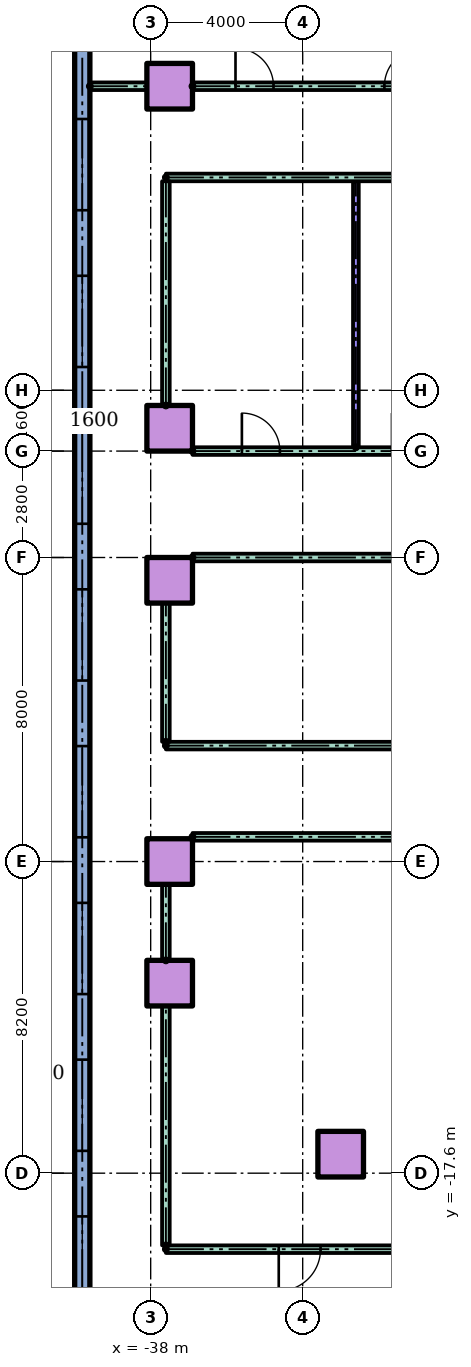
"""IFC4 building model, lengths in metres.
Left out: names, types, materials, properties, quantities, classifications, styles, units other than length and angle.
Written with IfcOpenShell. Run it as: python <this file> out.ifc"""

import sys

from ifc_helpers import new_model, si_unit, direction, frame, frame_2d, origin, origin_2d, place, context, subcontext, project, spatial, rectangle, hollow_rectangle, extrude, element, fill, save


model = new_model("IFC4")
c1 = context("Model", 3, precision=1e-05, world=origin(), true_north=direction((0.0, 1.0)))
c2 = subcontext(c1, "Body", "Model", "MODEL_VIEW")
j1 = project(units=[si_unit("LENGTHUNIT", "METRE"), si_unit("PLANEANGLEUNIT", "RADIAN")], contexts=[c1])
p1 = place(None, origin())
s1 = spatial("IfcSite", under=j1, at=p1, CompositionType="ELEMENT")
p2 = place(p1, origin())
s2 = spatial("IfcBuilding", under=s1, at=p2, CompositionType="ELEMENT")
p3 = place(p2, frame((0.0, 0.0, 10.0)))
s3 = spatial("IfcBuildingStorey", under=s2, at=p3, CompositionType="ELEMENT", Elevation=10.0)
for number, where in (
    (1, (-33.0, -17.1, 0.0)),
    (2, (-37.5, -12.6, 0.0)),
    (3, (-37.5, -9.4, 0.0)),
    (4, (-37.5, -2.0, 0.0)),
    (5, (-37.5, 2.0, 0.0)),
    (6, (-37.5, 11.0, 0.0)),
):
    element("IfcColumn", number, at=place(p3, frame(where)), inside=s3, PredefinedType="COLUMN", context=c2, shape_type="SweptSolid", body=[
        extrude(hollow_rectangle(XDim=1.2, YDim=1.2, WallThickness=0.06, at=origin_2d()), origin(), (0.0, 0.0, 1.0), 4.0),
    ])
p4 = place(p3, frame((-39.8, 20.0, 0.0), z_axis=(0.0, 0.0, 1.0), x_axis=(0.0, -1.0, 0.0)))
e7 = element("IfcWall", 7, at=p4, inside=s3, PredefinedType="STANDARD", context=c2, shape_type="SweptSolid", body=[
    extrude(rectangle(XDim=70.0, YDim=0.4, at=frame_2d((35.0, 0.0))), origin(), (0.0, 0.0, 1.0), 3.7),
])
p5 = place(p4, frame((1.05, 0.0, 0.9)))
e8 = element("IfcOpeningElement", 8, at=p5, cuts=e7, PredefinedType="OPENING", context=c2, shape_type="SweptSolid", body=[
    extrude(rectangle(XDim=2.4, YDim=2.1, at=frame_2d((1.2, 1.05))), frame((0.0, 0.21, 0.0), z_axis=(0.0, -1.0, 0.0), x_axis=(1.0, 0.0, 0.0)), (0.0, 0.0, 1.0), 0.42),
])
p6 = place(p4, frame((5.55, 0.0, 0.9)))
e9 = element("IfcOpeningElement", 9, at=p6, cuts=e7, PredefinedType="OPENING", context=c2, shape_type="SweptSolid", body=[
    extrude(rectangle(XDim=2.4, YDim=2.1, at=frame_2d((1.2, 1.05))), frame((0.0, 0.21, 0.0), z_axis=(0.0, -1.0, 0.0), x_axis=(1.0, 0.0, 0.0)), (0.0, 0.0, 1.0), 0.42),
])
p7 = place(p4, frame((9.863, 0.0, 0.9)))
e10 = element("IfcOpeningElement", 10, at=p7, cuts=e7, PredefinedType="OPENING", context=c2, shape_type="SweptSolid", body=[
    extrude(rectangle(XDim=2.4, YDim=2.1, at=frame_2d((1.2, 1.05))), frame((0.0, 0.21, 0.0), z_axis=(0.0, -1.0, 0.0), x_axis=(1.0, 0.0, 0.0)), (0.0, 0.0, 1.0), 0.42),
])
p8 = place(p4, frame((13.988, 0.0, 0.9)))
e11 = element("IfcOpeningElement", 11, at=p8, cuts=e7, PredefinedType="OPENING", context=c2, shape_type="SweptSolid", body=[
    extrude(rectangle(XDim=2.4, YDim=2.1, at=frame_2d((1.2, 1.05))), frame((0.0, 0.21, 0.0), z_axis=(0.0, -1.0, 0.0), x_axis=(1.0, 0.0, 0.0)), (0.0, 0.0, 1.0), 0.42),
])
p9 = place(p4, frame((18.113, 0.0, 0.9)))
e12 = element("IfcOpeningElement", 12, at=p9, cuts=e7, PredefinedType="OPENING", context=c2, shape_type="SweptSolid", body=[
    extrude(rectangle(XDim=2.4, YDim=2.1, at=frame_2d((1.2, 1.05))), frame((0.0, 0.21, 0.0), z_axis=(0.0, -1.0, 0.0), x_axis=(1.0, 0.0, 0.0)), (0.0, 0.0, 1.0), 0.42),
])
p10 = place(p4, frame((22.238, 0.0, 0.9)))
e13 = element("IfcOpeningElement", 13, at=p10, cuts=e7, PredefinedType="OPENING", context=c2, shape_type="SweptSolid", body=[
    extrude(rectangle(XDim=2.4, YDim=2.1, at=frame_2d((1.2, 1.05))), frame((0.0, 0.21, 0.0), z_axis=(0.0, -1.0, 0.0), x_axis=(1.0, 0.0, 0.0)), (0.0, 0.0, 1.0), 0.42),
])
p11 = place(p4, frame((26.363, 0.0, 0.9)))
e14 = element("IfcOpeningElement", 14, at=p11, cuts=e7, PredefinedType="OPENING", context=c2, shape_type="SweptSolid", body=[
    extrude(rectangle(XDim=2.4, YDim=2.1, at=frame_2d((1.2, 1.05))), frame((0.0, 0.21, 0.0), z_axis=(0.0, -1.0, 0.0), x_axis=(1.0, 0.0, 0.0)), (0.0, 0.0, 1.0), 0.42),
])
p12 = place(p4, frame((30.488, 0.0, 0.9)))
e15 = element("IfcOpeningElement", 15, at=p12, cuts=e7, PredefinedType="OPENING", context=c2, shape_type="SweptSolid", body=[
    extrude(rectangle(XDim=2.4, YDim=2.1, at=frame_2d((1.2, 1.05))), frame((0.0, 0.21, 0.0), z_axis=(0.0, -1.0, 0.0), x_axis=(1.0, 0.0, 0.0)), (0.0, 0.0, 1.0), 0.42),
])
p13 = place(p4, frame((34.613, 0.0, 0.9)))
e16 = element("IfcOpeningElement", 16, at=p13, cuts=e7, PredefinedType="OPENING", context=c2, shape_type="SweptSolid", body=[
    extrude(rectangle(XDim=2.4, YDim=2.1, at=frame_2d((1.2, 1.05))), frame((0.0, 0.21, 0.0), z_axis=(0.0, -1.0, 0.0), x_axis=(1.0, 0.0, 0.0)), (0.0, 0.0, 1.0), 0.42),
])
p14 = place(p4, frame((38.738, 0.0, 0.9)))
e17 = element("IfcOpeningElement", 17, at=p14, cuts=e7, PredefinedType="OPENING", context=c2, shape_type="SweptSolid", body=[
    extrude(rectangle(XDim=2.4, YDim=2.1, at=frame_2d((1.2, 1.05))), frame((0.0, 0.21, 0.0), z_axis=(0.0, -1.0, 0.0), x_axis=(1.0, 0.0, 0.0)), (0.0, 0.0, 1.0), 0.42),
])
p15 = place(p4, frame((42.633, 0.0, 0.9)))
e18 = element("IfcOpeningElement", 18, at=p15, cuts=e7, PredefinedType="OPENING", context=c2, shape_type="SweptSolid", body=[
    extrude(rectangle(XDim=2.4, YDim=2.1, at=frame_2d((1.2, 1.05))), frame((0.0, 0.21, 0.0), z_axis=(0.0, -1.0, 0.0), x_axis=(1.0, 0.0, 0.0)), (0.0, 0.0, 1.0), 0.42),
])
p16 = place(p4, frame((46.3, 0.0, 0.9)))
e19 = element("IfcOpeningElement", 19, at=p16, cuts=e7, PredefinedType="OPENING", context=c2, shape_type="SweptSolid", body=[
    extrude(rectangle(XDim=2.4, YDim=2.1, at=frame_2d((1.2, 1.05))), frame((0.0, 0.21, 0.0), z_axis=(0.0, -1.0, 0.0), x_axis=(1.0, 0.0, 0.0)), (0.0, 0.0, 1.0), 0.42),
])
p17 = place(p4, frame((49.967, 0.0, 0.9)))
e20 = element("IfcOpeningElement", 20, at=p17, cuts=e7, PredefinedType="OPENING", context=c2, shape_type="SweptSolid", body=[
    extrude(rectangle(XDim=2.4, YDim=2.1, at=frame_2d((1.2, 1.05))), frame((0.0, 0.21, 0.0), z_axis=(0.0, -1.0, 0.0), x_axis=(1.0, 0.0, 0.0)), (0.0, 0.0, 1.0), 0.42),
])
p18 = place(p4, frame((66.85, 0.0, 0.9)))
e21 = element("IfcOpeningElement", 21, at=p18, cuts=e7, PredefinedType="OPENING", context=c2, shape_type="SweptSolid", body=[
    extrude(rectangle(XDim=2.4, YDim=2.1, at=frame_2d((1.2, 1.05))), frame((0.0, 0.21, 0.0), z_axis=(0.0, -1.0, 0.0), x_axis=(1.0, 0.0, 0.0)), (0.0, 0.0, 1.0), 0.42),
])
p19 = place(p3, frame((-37.6, -19.6, 0.0)))
e22 = element("IfcWall", 22, at=p19, inside=s3, PredefinedType="PARTITIONING", context=c2, shape_type="SweptSolid", body=[
    extrude(rectangle(XDim=75.2, YDim=0.2, at=frame_2d((37.6, 0.0))), origin(), (0.0, 0.0, 1.0), 3.7),
])
p20 = place(p19, frame((2.97, 0.0, 0.0)))
e23 = element("IfcOpeningElement", 23, at=p20, cuts=e22, PredefinedType="OPENING", context=c2, shape_type="SweptSolid", body=[
    extrude(rectangle(XDim=1.1, YDim=2.1, at=frame_2d((0.55, 1.05))), frame((0.0, 0.11, 0.0), z_axis=(0.0, -1.0, 0.0), x_axis=(1.0, 0.0, 0.0)), (0.0, 0.0, 1.0), 0.22),
])
p21 = place(p19, frame((11.93, 0.0, 0.0)))
e24 = element("IfcOpeningElement", 24, at=p21, cuts=e22, PredefinedType="OPENING", context=c2, shape_type="SweptSolid", body=[
    extrude(rectangle(XDim=1.1, YDim=2.1, at=frame_2d((0.55, 1.05))), frame((0.0, 0.11, 0.0), z_axis=(0.0, -1.0, 0.0), x_axis=(1.0, 0.0, 0.0)), (0.0, 0.0, 1.0), 0.22),
])
p22 = place(p19, frame((21.5, 0.0, 0.0)))
e25 = element("IfcOpeningElement", 25, at=p22, cuts=e22, PredefinedType="OPENING", context=c2, shape_type="SweptSolid", body=[
    extrude(rectangle(XDim=1.0, YDim=2.1, at=frame_2d((0.5, 1.05))), frame((0.0, 0.11, 0.0), z_axis=(0.0, -1.0, 0.0), x_axis=(1.0, 0.0, 0.0)), (0.0, 0.0, 1.0), 0.22),
])
p23 = place(p19, frame((32.5, 0.0, 0.0)))
e26 = element("IfcOpeningElement", 26, at=p23, cuts=e22, PredefinedType="OPENING", context=c2, shape_type="SweptSolid", body=[
    extrude(rectangle(XDim=1.0, YDim=2.1, at=frame_2d((0.5, 1.05))), frame((0.0, 0.11, 0.0), z_axis=(0.0, -1.0, 0.0), x_axis=(1.0, 0.0, 0.0)), (0.0, 0.0, 1.0), 0.22),
])
p24 = place(p19, frame((41.5, 0.0, 0.0)))
e27 = element("IfcOpeningElement", 27, at=p24, cuts=e22, PredefinedType="OPENING", context=c2, shape_type="SweptSolid", body=[
    extrude(rectangle(XDim=1.0, YDim=2.1, at=frame_2d((0.5, 1.05))), frame((0.0, 0.11, 0.0), z_axis=(0.0, -1.0, 0.0), x_axis=(1.0, 0.0, 0.0)), (0.0, 0.0, 1.0), 0.22),
])
p25 = place(p19, frame((50.5, 0.0, 0.0)))
e28 = element("IfcOpeningElement", 28, at=p25, cuts=e22, PredefinedType="OPENING", context=c2, shape_type="SweptSolid", body=[
    extrude(rectangle(XDim=1.0, YDim=2.1, at=frame_2d((0.5, 1.05))), frame((0.0, 0.11, 0.0), z_axis=(0.0, -1.0, 0.0), x_axis=(1.0, 0.0, 0.0)), (0.0, 0.0, 1.0), 0.22),
])
p26 = place(p19, frame((59.724, 0.0, 0.0)))
e29 = element("IfcOpeningElement", 29, at=p26, cuts=e22, PredefinedType="OPENING", context=c2, shape_type="SweptSolid", body=[
    extrude(rectangle(XDim=1.0, YDim=2.1, at=frame_2d((0.5, 1.05))), frame((0.0, 0.11, 0.0), z_axis=(0.0, -1.0, 0.0), x_axis=(1.0, 0.0, 0.0)), (0.0, 0.0, 1.0), 0.22),
])
p27 = place(p19, frame((70.476, 0.0, 0.0)))
e30 = element("IfcOpeningElement", 30, at=p27, cuts=e22, PredefinedType="OPENING", context=c2, shape_type="SweptSolid", body=[
    extrude(rectangle(XDim=1.0, YDim=2.1, at=frame_2d((0.5, 1.05))), frame((0.0, 0.11, 0.0), z_axis=(0.0, -1.0, 0.0), x_axis=(1.0, 0.0, 0.0)), (0.0, 0.0, 1.0), 0.22),
])
p28 = place(p3, frame((-36.9, -8.75, 0.0)))
e31 = element("IfcWall", 31, at=p28, inside=s3, PredefinedType="PARTITIONING", context=c2, shape_type="SweptSolid", body=[
    extrude(rectangle(XDim=73.8, YDim=0.2, at=frame_2d((36.9, 0.0))), origin(), (0.0, 0.0, 1.0), 3.7),
])
p29 = place(p3, frame((-37.6, -6.35, 0.0)))
e32 = element("IfcWall", 32, at=p29, inside=s3, PredefinedType="PARTITIONING", context=c2, shape_type="SweptSolid", body=[
    extrude(rectangle(XDim=75.2, YDim=0.2, at=frame_2d((37.6, 0.0))), origin(), (0.0, 0.0, 1.0), 3.7),
])
p30 = place(p29, frame((6.5, 0.0, 0.0)))
e33 = element("IfcOpeningElement", 33, at=p30, cuts=e32, PredefinedType="OPENING", context=c2, shape_type="SweptSolid", body=[
    extrude(rectangle(XDim=1.0, YDim=2.1, at=frame_2d((0.5, 1.05))), frame((0.0, 0.11, 0.0), z_axis=(0.0, -1.0, 0.0), x_axis=(1.0, 0.0, 0.0)), (0.0, 0.0, 1.0), 0.22),
])
p31 = place(p29, frame((18.55, 0.0, 0.0)))
e34 = element("IfcOpeningElement", 34, at=p31, cuts=e32, PredefinedType="OPENING", context=c2, shape_type="SweptSolid", body=[
    extrude(rectangle(XDim=0.9, YDim=2.1, at=frame_2d((0.45, 1.05))), frame((0.0, 0.11, 0.0), z_axis=(0.0, -1.0, 0.0), x_axis=(1.0, 0.0, 0.0)), (0.0, 0.0, 1.0), 0.22),
])
p32 = place(p29, frame((27.55, 0.0, 0.0)))
e35 = element("IfcOpeningElement", 35, at=p32, cuts=e32, PredefinedType="OPENING", context=c2, shape_type="SweptSolid", body=[
    extrude(rectangle(XDim=0.9, YDim=2.1, at=frame_2d((0.45, 1.05))), frame((0.0, 0.11, 0.0), z_axis=(0.0, -1.0, 0.0), x_axis=(1.0, 0.0, 0.0)), (0.0, 0.0, 1.0), 0.22),
])
p33 = place(p29, frame((36.55, 0.0, 0.0)))
e36 = element("IfcOpeningElement", 36, at=p33, cuts=e32, PredefinedType="OPENING", context=c2, shape_type="SweptSolid", body=[
    extrude(rectangle(XDim=0.9, YDim=2.1, at=frame_2d((0.45, 1.05))), frame((0.0, 0.11, 0.0), z_axis=(0.0, -1.0, 0.0), x_axis=(1.0, 0.0, 0.0)), (0.0, 0.0, 1.0), 0.22),
])
p34 = place(p29, frame((48.5, 0.0, 0.0)))
e37 = element("IfcOpeningElement", 37, at=p34, cuts=e32, PredefinedType="OPENING", context=c2, shape_type="SweptSolid", body=[
    extrude(rectangle(XDim=1.0, YDim=2.1, at=frame_2d((0.5, 1.05))), frame((0.0, 0.11, 0.0), z_axis=(0.0, -1.0, 0.0), x_axis=(1.0, 0.0, 0.0)), (0.0, 0.0, 1.0), 0.22),
])
p35 = place(p29, frame((65.15, 0.0, 0.0)))
e38 = element("IfcOpeningElement", 38, at=p35, cuts=e32, PredefinedType="OPENING", context=c2, shape_type="SweptSolid", body=[
    extrude(rectangle(XDim=0.9, YDim=2.1, at=frame_2d((0.45, 1.05))), frame((0.0, 0.11, 0.0), z_axis=(0.0, -1.0, 0.0), x_axis=(1.0, 0.0, 0.0)), (0.0, 0.0, 1.0), 0.22),
])
p36 = place(p3, frame((-36.9, -1.4, 0.0)))
e39 = element("IfcWall", 39, at=p36, inside=s3, PredefinedType="PARTITIONING", context=c2, shape_type="SweptSolid", body=[
    extrude(rectangle(XDim=22.9, YDim=0.2, at=frame_2d((11.45, 0.0))), origin(), (0.0, 0.0, 1.0), 3.7),
])
p37 = place(p3, frame((-36.9, 1.4, 0.0)))
e40 = element("IfcWall", 40, at=p37, inside=s3, PredefinedType="PARTITIONING", context=c2, shape_type="SweptSolid", body=[
    extrude(rectangle(XDim=20.6, YDim=0.2, at=frame_2d((10.3, 0.0))), origin(), (0.0, 0.0, 1.0), 3.7),
])
p38 = place(p37, frame((1.3, 0.0, 0.0)))
e41 = element("IfcOpeningElement", 41, at=p38, cuts=e40, PredefinedType="OPENING", context=c2, shape_type="SweptSolid", body=[
    extrude(rectangle(XDim=1.0, YDim=2.1, at=frame_2d((0.5, 1.05))), frame((0.0, 0.11, 0.0), z_axis=(0.0, -1.0, 0.0), x_axis=(1.0, 0.0, 0.0)), (0.0, 0.0, 1.0), 0.22),
])
p39 = place(p37, frame((5.25, 0.0, 0.0)))
e42 = element("IfcOpeningElement", 42, at=p39, cuts=e40, PredefinedType="OPENING", context=c2, shape_type="SweptSolid", body=[
    extrude(rectangle(XDim=1.0, YDim=2.1, at=frame_2d((0.5, 1.05))), frame((0.0, 0.11, 0.0), z_axis=(0.0, -1.0, 0.0), x_axis=(1.0, 0.0, 0.0)), (0.0, 0.0, 1.0), 0.22),
])
p40 = place(p37, frame((10.0, 0.0, 0.0)))
e43 = element("IfcOpeningElement", 43, at=p40, cuts=e40, PredefinedType="OPENING", context=c2, shape_type="SweptSolid", body=[
    extrude(rectangle(XDim=1.0, YDim=2.1, at=frame_2d((0.5, 1.05))), frame((0.0, 0.11, 0.0), z_axis=(0.0, -1.0, 0.0), x_axis=(1.0, 0.0, 0.0)), (0.0, 0.0, 1.0), 0.22),
])
p41 = place(p37, frame((12.35, 0.0, 0.0)))
e44 = element("IfcOpeningElement", 44, at=p41, cuts=e40, PredefinedType="OPENING", context=c2, shape_type="SweptSolid", body=[
    extrude(rectangle(XDim=0.9, YDim=2.1, at=frame_2d((0.45, 1.05))), frame((0.0, 0.11, 0.0), z_axis=(0.0, -1.0, 0.0), x_axis=(1.0, 0.0, 0.0)), (0.0, 0.0, 1.0), 0.22),
])
p42 = place(p3, frame((-37.6, 8.6, 0.0)))
e45 = element("IfcWall", 45, at=p42, inside=s3, PredefinedType="PARTITIONING", context=c2, shape_type="SweptSolid", body=[
    extrude(rectangle(XDim=21.3, YDim=0.2, at=frame_2d((10.65, 0.0))), origin(), (0.0, 0.0, 1.0), 3.7),
])
p43 = place(p3, frame((-39.6, 11.0, 0.0)))
e46 = element("IfcWall", 46, at=p43, inside=s3, PredefinedType="PARTITIONING", context=c2, shape_type="SweptSolid", body=[
    extrude(rectangle(XDim=1.5, YDim=0.2, at=frame_2d((0.75, 0.0))), origin(), (0.0, 0.0, 1.0), 3.7),
])
p44 = place(p3, frame((-36.9, 11.0, 0.0)))
e47 = element("IfcWall", 47, at=p44, inside=s3, PredefinedType="PARTITIONING", context=c2, shape_type="SweptSolid", body=[
    extrude(rectangle(XDim=6.4, YDim=0.2, at=frame_2d((3.2, 0.0))), origin(), (0.0, 0.0, 1.0), 3.7),
])
p45 = place(p44, frame((1.132, 0.0, 0.0)))
e48 = element("IfcOpeningElement", 48, at=p45, cuts=e47, PredefinedType="OPENING", context=c2, shape_type="SweptSolid", body=[
    extrude(rectangle(XDim=1.0, YDim=2.1, at=frame_2d((0.5, 1.05))), frame((0.0, 0.11, 0.0), z_axis=(0.0, -1.0, 0.0), x_axis=(1.0, 0.0, 0.0)), (0.0, 0.0, 1.0), 0.22),
])
p46 = place(p44, frame((5.05, 0.0, 0.0)))
e49 = element("IfcOpeningElement", 49, at=p46, cuts=e47, PredefinedType="OPENING", context=c2, shape_type="SweptSolid", body=[
    extrude(rectangle(XDim=1.0, YDim=2.1, at=frame_2d((0.5, 1.05))), frame((0.0, 0.11, 0.0), z_axis=(0.0, -1.0, 0.0), x_axis=(1.0, 0.0, 0.0)), (0.0, 0.0, 1.0), 0.22),
])
p47 = place(p3, frame((-37.6, -19.5, 0.0), z_axis=(0.0, 0.0, 1.0), x_axis=(0.0, 1.0, 0.0)))
e50 = element("IfcWall", 50, at=p47, inside=s3, PredefinedType="PARTITIONING", context=c2, shape_type="SweptSolid", body=[
    extrude(rectangle(XDim=6.3, YDim=0.2, at=frame_2d((3.15, 0.0))), origin(), (0.0, 0.0, 1.0), 3.7),
])
p48 = place(p3, frame((-37.6, -12.0, 0.0), z_axis=(0.0, 0.0, 1.0), x_axis=(0.0, 1.0, 0.0)))
e51 = element("IfcWall", 51, at=p48, inside=s3, PredefinedType="PARTITIONING", context=c2, shape_type="SweptSolid", body=[
    extrude(rectangle(XDim=2.0, YDim=0.2, at=frame_2d((1.0, 0.0))), origin(), (0.0, 0.0, 1.0), 3.7),
])
p49 = place(p3, frame((-37.6, -6.25, 0.0), z_axis=(0.0, 0.0, 1.0), x_axis=(0.0, 1.0, 0.0)))
e52 = element("IfcWall", 52, at=p49, inside=s3, PredefinedType="PARTITIONING", context=c2, shape_type="SweptSolid", body=[
    extrude(rectangle(XDim=3.65, YDim=0.2, at=frame_2d((1.825, 0.0))), origin(), (0.0, 0.0, 1.0), 3.7),
])
p50 = place(p3, frame((-37.6, 2.6, 0.0), z_axis=(0.0, 0.0, 1.0), x_axis=(0.0, 1.0, 0.0)))
e53 = element("IfcWall", 53, at=p50, inside=s3, PredefinedType="PARTITIONING", context=c2, shape_type="SweptSolid", body=[
    extrude(rectangle(XDim=5.9, YDim=0.2, at=frame_2d((2.95, 0.0))), origin(), (0.0, 0.0, 1.0), 3.7),
])
p51 = place(p3, frame((-32.6, 1.5, 0.0), z_axis=(0.0, 0.0, 1.0), x_axis=(0.0, 1.0, 0.0)))
e54 = element("IfcWall", 54, at=p51, inside=s3, PredefinedType="PARTITIONING", context=c2, shape_type="SweptSolid", body=[
    extrude(rectangle(XDim=7.0, YDim=0.15, at=frame_2d((3.5, 0.0))), origin(), (0.0, 0.0, 1.0), 3.7),
])
p52 = place(p7, origin())
e55 = element("IfcWindow", 55, at=p52, inside=s3, PartitioningType="SINGLE_PANEL", PredefinedType="WINDOW", context=c2, shape_type="SweptSolid", body=[
    extrude(rectangle(XDim=2.4, YDim=2.1, at=frame_2d((1.2, 1.05))), frame((0.0, 0.03, 0.0), z_axis=(0.0, -1.0, 0.0), x_axis=(1.0, 0.0, 0.0)), (0.0, 0.0, 1.0), 0.06),
])
fill(e10, e55)
p53 = place(p8, origin())
e56 = element("IfcWindow", 56, at=p53, inside=s3, PartitioningType="SINGLE_PANEL", PredefinedType="WINDOW", context=c2, shape_type="SweptSolid", body=[
    extrude(rectangle(XDim=2.4, YDim=2.1, at=frame_2d((1.2, 1.05))), frame((0.0, 0.03, 0.0), z_axis=(0.0, -1.0, 0.0), x_axis=(1.0, 0.0, 0.0)), (0.0, 0.0, 1.0), 0.06),
])
fill(e11, e56)
p54 = place(p9, origin())
e57 = element("IfcWindow", 57, at=p54, inside=s3, PartitioningType="SINGLE_PANEL", PredefinedType="WINDOW", context=c2, shape_type="SweptSolid", body=[
    extrude(rectangle(XDim=2.4, YDim=2.1, at=frame_2d((1.2, 1.05))), frame((0.0, 0.03, 0.0), z_axis=(0.0, -1.0, 0.0), x_axis=(1.0, 0.0, 0.0)), (0.0, 0.0, 1.0), 0.06),
])
fill(e12, e57)
p55 = place(p10, origin())
e58 = element("IfcWindow", 58, at=p55, inside=s3, PartitioningType="SINGLE_PANEL", PredefinedType="WINDOW", context=c2, shape_type="SweptSolid", body=[
    extrude(rectangle(XDim=2.4, YDim=2.1, at=frame_2d((1.2, 1.05))), frame((0.0, 0.03, 0.0), z_axis=(0.0, -1.0, 0.0), x_axis=(1.0, 0.0, 0.0)), (0.0, 0.0, 1.0), 0.06),
])
fill(e13, e58)
p56 = place(p11, origin())
e59 = element("IfcWindow", 59, at=p56, inside=s3, PartitioningType="SINGLE_PANEL", PredefinedType="WINDOW", context=c2, shape_type="SweptSolid", body=[
    extrude(rectangle(XDim=2.4, YDim=2.1, at=frame_2d((1.2, 1.05))), frame((0.0, 0.03, 0.0), z_axis=(0.0, -1.0, 0.0), x_axis=(1.0, 0.0, 0.0)), (0.0, 0.0, 1.0), 0.06),
])
fill(e14, e59)
p57 = place(p12, origin())
e60 = element("IfcWindow", 60, at=p57, inside=s3, PartitioningType="SINGLE_PANEL", PredefinedType="WINDOW", context=c2, shape_type="SweptSolid", body=[
    extrude(rectangle(XDim=2.4, YDim=2.1, at=frame_2d((1.2, 1.05))), frame((0.0, 0.03, 0.0), z_axis=(0.0, -1.0, 0.0), x_axis=(1.0, 0.0, 0.0)), (0.0, 0.0, 1.0), 0.06),
])
fill(e15, e60)
p58 = place(p13, origin())
e61 = element("IfcWindow", 61, at=p58, inside=s3, PartitioningType="SINGLE_PANEL", PredefinedType="WINDOW", context=c2, shape_type="SweptSolid", body=[
    extrude(rectangle(XDim=2.4, YDim=2.1, at=frame_2d((1.2, 1.05))), frame((0.0, 0.03, 0.0), z_axis=(0.0, -1.0, 0.0), x_axis=(1.0, 0.0, 0.0)), (0.0, 0.0, 1.0), 0.06),
])
fill(e16, e61)
p59 = place(p14, origin())
e62 = element("IfcWindow", 62, at=p59, inside=s3, PartitioningType="SINGLE_PANEL", PredefinedType="WINDOW", context=c2, shape_type="SweptSolid", body=[
    extrude(rectangle(XDim=2.4, YDim=2.1, at=frame_2d((1.2, 1.05))), frame((0.0, 0.03, 0.0), z_axis=(0.0, -1.0, 0.0), x_axis=(1.0, 0.0, 0.0)), (0.0, 0.0, 1.0), 0.06),
])
fill(e17, e62)
p60 = place(p20, frame((1.1, 0.0, 0.0), z_axis=(0.0, 0.0, 1.0), x_axis=(-1.0, 0.0, 0.0)))
e63 = element("IfcDoor", 63, at=p60, inside=s3, OperationType="SINGLE_SWING_LEFT", PredefinedType="DOOR", context=c2, shape_type="SweptSolid", body=[
    extrude(rectangle(XDim=1.1, YDim=2.1, at=frame_2d((0.55, 1.05))), frame((0.0, 0.025, 0.0), z_axis=(0.0, -1.0, 0.0), x_axis=(1.0, 0.0, 0.0)), (0.0, 0.0, 1.0), 0.05),
])
fill(e23, e63)
p61 = place(p38, origin())
e64 = element("IfcDoor", 64, at=p61, inside=s3, OperationType="SINGLE_SWING_LEFT", PredefinedType="DOOR", context=c2, shape_type="SweptSolid", body=[
    extrude(rectangle(XDim=1.0, YDim=2.1, at=frame_2d((0.5, 1.05))), frame((0.0, 0.025, 0.0), z_axis=(0.0, -1.0, 0.0), x_axis=(1.0, 0.0, 0.0)), (0.0, 0.0, 1.0), 0.05),
])
fill(e41, e64)
p62 = place(p45, origin())
e65 = element("IfcDoor", 65, at=p62, inside=s3, OperationType="SINGLE_SWING_LEFT", PredefinedType="DOOR", context=c2, shape_type="SweptSolid", body=[
    extrude(rectangle(XDim=1.0, YDim=2.1, at=frame_2d((0.5, 1.05))), frame((0.0, 0.025, 0.0), z_axis=(0.0, -1.0, 0.0), x_axis=(1.0, 0.0, 0.0)), (0.0, 0.0, 1.0), 0.05),
])
fill(e48, e65)
p63 = place(p46, origin())
e66 = element("IfcDoor", 66, at=p63, inside=s3, OperationType="SINGLE_SWING_RIGHT", PredefinedType="DOOR", context=c2, shape_type="SweptSolid", body=[
    extrude(rectangle(XDim=1.0, YDim=2.1, at=frame_2d((0.5, 1.05))), frame((0.0, 0.025, 0.0), z_axis=(0.0, -1.0, 0.0), x_axis=(1.0, 0.0, 0.0)), (0.0, 0.0, 1.0), 0.05),
])
fill(e49, e66)
save(model, sys.argv[1])
